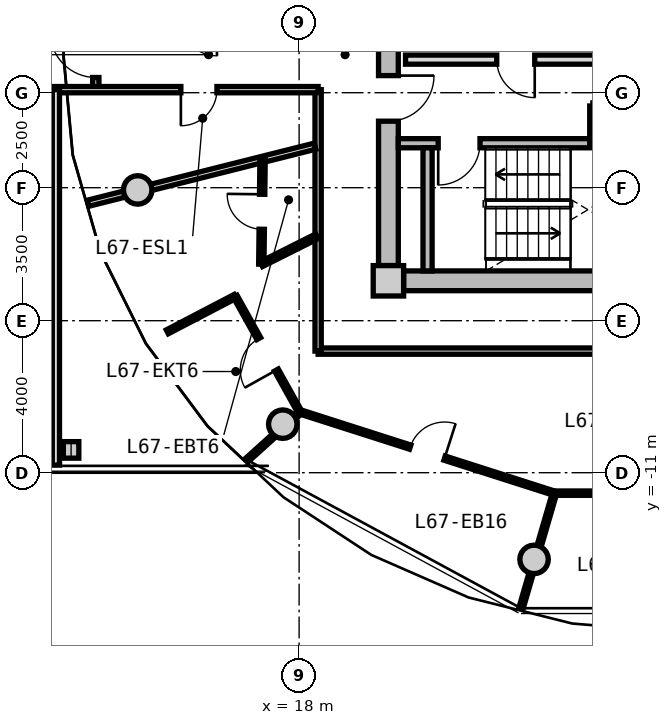
"""IFC4 building model, lengths in metres.
Left out: names, types, materials, properties, quantities, classifications, styles, units other than length and angle.
Written with IfcOpenShell. Run it as: python <this file> out.ifc"""

import sys

from ifc_helpers import new_model, si_unit, direction, frame, frame_2d, origin, origin_2d, place, context, subcontext, project, spatial, rectangle, circle, i_section, extrude, source, transform, mapped, element, fill, save


model = new_model("IFC4")
c1 = context("Model", 3, precision=1e-05, world=origin(), true_north=direction((0.0, 1.0)))
c2 = subcontext(c1, "Body", "Model", "MODEL_VIEW")
j1 = project(units=[si_unit("LENGTHUNIT", "METRE"), si_unit("PLANEANGLEUNIT", "RADIAN")], contexts=[c1])
p1 = place(None, origin())
s1 = spatial("IfcSite", under=j1, at=p1, CompositionType="ELEMENT")
p2 = place(p1, origin())
s2 = spatial("IfcBuilding", under=s1, at=p2, CompositionType="ELEMENT")
p3 = place(p2, frame((0.0, 0.0, 216.95)))
s3 = spatial("IfcBuildingStorey", under=s2, at=p3, CompositionType="ELEMENT", Elevation=216.95)
m1 = source(origin(), c2, "Body", "SweptSolid", [
    extrude(rectangle(XDim=0.8, YDim=0.8, at=origin_2d()), origin(), (0.0, 0.0, 1.0), 3.05),
])
p4 = place(p3, frame((20.35, -5.95, 0.0), z_axis=(0.0, 0.0, 1.0), x_axis=(1.0, 0.0, 0.0)))
e1 = element("IfcColumn", 1, at=p4, inside=s3, PredefinedType="COLUMN", context=c2, shape_type="MappedRepresentation", body=[
    mapped(m1, transform((0.0, 0.0, 0.0), x_axis=(1.0, 0.0, 0.0), y_axis=(0.0, 1.0, 0.0), z_axis=(0.0, 0.0, 1.0), scale=1.0)),
])
m2 = source(origin(), c2, "Body", "SweptSolid", [
    extrude(rectangle(XDim=14.5, YDim=0.52, at=frame_2d((7.25, 0.0))), origin(), (0.0, 0.0, 1.0), 2.76),
])
p5 = place(p3, frame((35.25, -5.95, 0.0), z_axis=(0.0, 0.0, 1.0), x_axis=(-1.0, 0.0, 0.0)))
e2 = element("IfcWall", 2, at=p5, inside=s3, PredefinedType="SHEAR", context=c2, shape_type="MappedRepresentation", body=[
    mapped(m2, transform((0.0, 0.0, 0.0), x_axis=(1.0, 0.0, 0.0), y_axis=(0.0, 1.0, 0.0), z_axis=(0.0, 0.0, 1.0), scale=1.0)),
])
m3 = source(origin(), c2, "Body", "SweptSolid", [
    extrude(rectangle(XDim=11.1, YDim=0.52, at=frame_2d((5.55, 0.0))), origin(), (0.0, 0.0, 1.0), 2.76),
])
p6 = place(p3, frame((20.35, -5.55, 0.0), z_axis=(0.0, 0.0, 1.0), x_axis=(0.0, 1.0, 0.0)))
e3 = element("IfcWall", 3, at=p6, inside=s3, PredefinedType="SHEAR", context=c2, shape_type="MappedRepresentation", body=[
    mapped(m3, transform((0.0, 0.0, 0.0), x_axis=(1.0, 0.0, 0.0), y_axis=(0.0, 1.0, 0.0), z_axis=(0.0, 0.0, 1.0), scale=1.0)),
])
p7 = place(p6, frame((3.8, 0.0, 0.0)))
e4 = element("IfcOpeningElement", 4, at=p7, cuts=e3, PredefinedType="OPENING", context=c2, shape_type="SweptSolid", body=[
    extrude(rectangle(XDim=1.2, YDim=2.15, at=frame_2d((0.6, 1.075))), frame((0.0, 0.27, 0.0), z_axis=(0.0, -1.0, 0.0), x_axis=(1.0, 0.0, 0.0)), (0.0, 0.0, 1.0), 0.54),
])
m4 = source(origin(), c2, "Body", "SweptSolid", [
    extrude(circle(Radius=0.375, at=origin_2d()), origin(), (0.0, 0.0, 1.0), 3.05),
])
for number, where, z_axis, x_axis in (
    (5, (13.753, -3.559, 0.0), (0.0, 0.0, 1.0), (1.0, 0.0, 0.0)),
    (6, (17.57, -9.723, 0.0), (0.0, 0.0, 1.0), (1.0, 0.0, 0.0)),
    (7, (24.182, -13.281, 0.0), (0.0, 0.0, 1.0), (1.0, 0.0, 0.0)),
):
    element("IfcColumn", number, at=place(p3, frame(where, z_axis=z_axis, x_axis=x_axis)), inside=s3, PredefinedType="COLUMN", context=c2, shape_type="MappedRepresentation", body=[
        mapped(m4, transform((0.0, 0.0, 0.0), x_axis=(1.0, 0.0, 0.0), y_axis=(0.0, 1.0, 0.0), z_axis=(0.0, 0.0, 1.0), scale=1.0)),
    ])
m5 = source(origin(), c2, "Body", "SweptSolid", [
    extrude(i_section(OverallWidth=0.407, OverallDepth=0.435, WebThickness=0.024, FlangeThickness=0.039, FilletRadius=0.015, at=origin_2d()), origin(), (0.0, 0.0, 1.0), 3.05),
])
p8 = place(p3, frame((12.0, -10.4, 0.0), z_axis=(0.0, 0.0, 1.0), x_axis=(1.0, 0.0, 0.0)))
e8 = element("IfcColumn", 8, at=p8, inside=s3, PredefinedType="COLUMN", context=c2, shape_type="MappedRepresentation", body=[
    mapped(m5, transform((0.0, 0.0, 0.0), x_axis=(1.0, 0.0, 0.0), y_axis=(0.0, 1.0, 0.0), z_axis=(0.0, 0.0, 1.0), scale=1.0)),
])
m6 = source(origin(), c2, "Body", "SweptSolid", [
    extrude(rectangle(XDim=7.93, YDim=0.24, at=frame_2d((3.965, 0.0))), origin(), (0.0, 0.0, 1.0), 2.76),
])
p9 = place(p3, frame((20.61, -2.33, 0.0), z_axis=(0.0, 0.0, 1.0), x_axis=(1.0, 0.0, 0.0)))
e9 = element("IfcWall", 9, at=p9, inside=s3, PredefinedType="PARTITIONING", context=c2, shape_type="MappedRepresentation", body=[
    mapped(m6, transform((0.0, 0.0, 0.0), x_axis=(1.0, 0.0, 0.0), y_axis=(0.0, 1.0, 0.0), z_axis=(0.0, 0.0, 1.0), scale=1.0)),
])
p10 = place(p9, frame((1.05, 0.0, 0.0)))
e10 = element("IfcOpeningElement", 10, at=p10, cuts=e9, PredefinedType="OPENING", context=c2, shape_type="SweptSolid", body=[
    extrude(rectangle(XDim=1.1, YDim=2.15, at=frame_2d((0.55, 1.075))), frame((0.0, 0.13, 0.0), z_axis=(0.0, -1.0, 0.0), x_axis=(1.0, 0.0, 0.0)), (0.0, 0.0, 1.0), 0.26),
])
m7 = source(origin(), c2, "Body", "SweptSolid", [
    extrude(rectangle(XDim=3.24, YDim=0.24, at=frame_2d((1.62, 0.0))), origin(), (0.0, 0.0, 1.0), 2.76),
])
p11 = place(p3, frame((21.38, -5.69, 0.0), z_axis=(0.0, 0.0, 1.0), x_axis=(0.0, 1.0, 0.0)))
e11 = element("IfcWall", 11, at=p11, inside=s3, PredefinedType="PARTITIONING", context=c2, shape_type="MappedRepresentation", body=[
    mapped(m7, transform((0.0, 0.0, 0.0), x_axis=(1.0, 0.0, 0.0), y_axis=(0.0, 1.0, 0.0), z_axis=(0.0, 0.0, 1.0), scale=1.0)),
])
m8 = source(origin(), c2, "Body", "SweptSolid", [
    extrude(rectangle(XDim=7.62, YDim=0.24, at=frame_2d((3.81, 0.0))), origin(), (0.0, 0.0, 1.0), 2.745),
])
p12 = place(p3, frame((20.8, -0.13, 0.0), z_axis=(0.0, 0.0, 1.0), x_axis=(1.0, 0.0, 0.0)))
e12 = element("IfcWall", 12, at=p12, inside=s3, PredefinedType="PARTITIONING", context=c2, shape_type="MappedRepresentation", body=[
    mapped(m8, transform((0.0, 0.0, 0.0), x_axis=(1.0, 0.0, 0.0), y_axis=(0.0, 1.0, 0.0), z_axis=(0.0, 0.0, 1.0), scale=1.0)),
])
p13 = place(p12, frame((6.22, 0.0, 0.0)))
e13 = element("IfcOpeningElement", 13, at=p13, cuts=e12, PredefinedType="OPENING", context=c2, shape_type="SweptSolid", body=[
    extrude(rectangle(XDim=1.0, YDim=2.1, at=frame_2d((0.5, 1.05))), frame((0.0, 0.13, 0.0), z_axis=(0.0, -1.0, 0.0), x_axis=(1.0, 0.0, 0.0)), (0.0, 0.0, 1.0), 0.26),
])
p14 = place(p12, frame((2.4, 0.0, 0.0)))
e14 = element("IfcOpeningElement", 14, at=p14, cuts=e12, PredefinedType="OPENING", context=c2, shape_type="SweptSolid", body=[
    extrude(rectangle(XDim=1.0, YDim=2.1, at=frame_2d((0.5, 1.05))), frame((0.0, 0.13, 0.0), z_axis=(0.0, -1.0, 0.0), x_axis=(1.0, 0.0, 0.0)), (0.0, 0.0, 1.0), 0.26),
])
m9 = source(origin(), c2, "Body", "SweptSolid", [
    extrude(rectangle(XDim=0.98, YDim=0.165, at=frame_2d((0.49, 0.0))), origin(), (0.0, 0.0, 1.0), 2.745),
])
p15 = place(p3, frame((25.73, -2.33, 0.0), z_axis=(0.0, 0.0, 1.0), x_axis=(0.0, 1.0, 0.0)))
e15 = element("IfcWall", 15, at=p15, inside=s3, PredefinedType="PARTITIONING", context=c2, shape_type="MappedRepresentation", body=[
    mapped(m9, transform((0.0, 0.0, 0.0), x_axis=(1.0, 0.0, 0.0), y_axis=(0.0, 1.0, 0.0), z_axis=(0.0, 0.0, 1.0), scale=1.0)),
])
m10 = source(origin(), c2, "Body", "SweptSolid", [
    extrude(rectangle(XDim=19.0, YDim=0.165, at=frame_2d((9.5, 0.0))), origin(), (0.0, 0.0, 1.0), 2.745),
])
p16 = place(p3, frame((37.5, -7.8, 0.0), z_axis=(0.0, 0.0, 1.0), x_axis=(-1.0, 0.0, 0.0)))
e16 = element("IfcWall", 16, at=p16, inside=s3, PredefinedType="PARTITIONING", context=c2, shape_type="MappedRepresentation", body=[
    mapped(m10, transform((0.0, 0.0, 0.0), x_axis=(1.0, 0.0, 0.0), y_axis=(0.0, 1.0, 0.0), z_axis=(0.0, 0.0, 1.0), scale=1.0)),
])
p17 = place(p16, frame((9.392, 0.0, 0.0)))
e17 = element("IfcOpeningElement", 17, at=p17, cuts=e16, PredefinedType="OPENING", context=c2, shape_type="SweptSolid", body=[
    extrude(rectangle(XDim=1.05, YDim=2.15, at=frame_2d((0.525, 1.075))), frame((0.0, 0.093, 0.0), z_axis=(0.0, -1.0, 0.0), x_axis=(1.0, 0.0, 0.0)), (0.0, 0.0, 1.0), 0.185),
])
m11 = source(origin(), c2, "Body", "SweptSolid", [
    extrude(rectangle(XDim=6.88, YDim=0.165, at=frame_2d((3.44, 0.0))), origin(), (0.0, 0.0, 1.0), 2.745),
])
p18 = place(p3, frame((18.5, -7.8, 0.0), z_axis=(0.0, 0.0, 1.0), x_axis=(0.0, 1.0, 0.0)))
e18 = element("IfcWall", 18, at=p18, inside=s3, PredefinedType="PARTITIONING", context=c2, shape_type="MappedRepresentation", body=[
    mapped(m11, transform((0.0, 0.0, 0.0), x_axis=(1.0, 0.0, 0.0), y_axis=(0.0, 1.0, 0.0), z_axis=(0.0, 0.0, 1.0), scale=1.0)),
])
m12 = source(origin(), c2, "Body", "SweptSolid", [
    extrude(rectangle(XDim=6.157, YDim=0.165, at=frame_2d((3.079, 0.0))), origin(), (0.0, 0.0, 1.0), 2.345),
])
p19 = place(p3, frame((18.42, -2.407, 0.0), z_axis=(0.0, 0.0, 1.0), x_axis=(-0.969840867184, -0.243738984038, 0.0)))
e19 = element("IfcWall", 19, at=p19, inside=s3, PredefinedType="PARTITIONING", context=c2, shape_type="MappedRepresentation", body=[
    mapped(m12, transform((0.0, 0.0, 0.0), x_axis=(1.0, 0.0, 0.0), y_axis=(0.0, 1.0, 0.0), z_axis=(0.0, 0.0, 1.0), scale=1.0)),
])
m13 = source(origin(), c2, "Body", "SweptSolid", [
    extrude(rectangle(XDim=7.024, YDim=0.115, at=frame_2d((3.512, 0.0))), origin(), (0.0, 0.0, 1.0), 2.745),
])
p20 = place(p3, frame((18.03, -9.401, 0.0), z_axis=(0.0, 0.0, 1.0), x_axis=(0.952454006655, -0.304682400552, 0.0)))
e20 = element("IfcWall", 20, at=p20, inside=s3, PredefinedType="PARTITIONING", context=c2, shape_type="MappedRepresentation", body=[
    mapped(m13, transform((0.0, 0.0, 0.0), x_axis=(1.0, 0.0, 0.0), y_axis=(0.0, 1.0, 0.0), z_axis=(0.0, 0.0, 1.0), scale=1.0)),
])
p21 = place(p20, frame((3.037, 0.0, 0.0)))
e21 = element("IfcOpeningElement", 21, at=p21, cuts=e20, PredefinedType="OPENING", context=c2, shape_type="SweptSolid", body=[
    extrude(rectangle(XDim=0.95, YDim=2.1, at=frame_2d((0.475, 1.05))), frame((0.0, 0.067, 0.0), z_axis=(0.0, -1.0, 0.0), x_axis=(1.0, 0.0, 0.0)), (0.0, 0.0, 1.0), 0.135),
])
m14 = source(origin(), c2, "Body", "SweptSolid", [
    extrude(rectangle(XDim=1.905, YDim=0.115, at=frame_2d((0.953, 0.0))), origin(), (0.0, 0.0, 1.0), 2.345),
])
p22 = place(p3, frame((18.03, -9.401, 0.0), z_axis=(0.0, 0.0, 1.0), x_axis=(-0.742624708137, -0.669707804094, 0.0)))
e22 = element("IfcWall", 22, at=p22, inside=s3, PredefinedType="PARTITIONING", context=c2, shape_type="MappedRepresentation", body=[
    mapped(m14, transform((0.0, 0.0, 0.0), x_axis=(1.0, 0.0, 0.0), y_axis=(0.0, 1.0, 0.0), z_axis=(0.0, 0.0, 1.0), scale=1.0)),
])
m15 = source(origin(), c2, "Body", "SweptSolid", [
    extrude(rectangle(XDim=6.558, YDim=0.115, at=frame_2d((3.279, 0.0))), origin(), (0.0, 0.0, 1.0), 2.745),
])
p23 = place(p3, frame((24.721, -11.539, 0.0), z_axis=(0.0, 0.0, 1.0), x_axis=(1.0, 0.0, 0.0)))
e23 = element("IfcWall", 23, at=p23, inside=s3, PredefinedType="PARTITIONING", context=c2, shape_type="MappedRepresentation", body=[
    mapped(m15, transform((0.0, 0.0, 0.0), x_axis=(1.0, 0.0, 0.0), y_axis=(0.0, 1.0, 0.0), z_axis=(0.0, 0.0, 1.0), scale=1.0)),
])
p24 = place(p23, frame((2.804, 0.0, 0.0)))
e24 = element("IfcOpeningElement", 24, at=p24, cuts=e23, PredefinedType="OPENING", context=c2, shape_type="SweptSolid", body=[
    extrude(rectangle(XDim=0.95, YDim=2.1, at=frame_2d((0.475, 1.05))), frame((0.0, 0.067, 0.0), z_axis=(0.0, -1.0, 0.0), x_axis=(1.0, 0.0, 0.0)), (0.0, 0.0, 1.0), 0.135),
])
m16 = source(origin(), c2, "Body", "SweptSolid", [
    extrude(rectangle(XDim=3.173, YDim=0.115, at=frame_2d((1.587, 0.0))), origin(), (0.0, 0.0, 1.0), 2.345),
])
p25 = place(p3, frame((24.721, -11.539, 0.0), z_axis=(0.0, 0.0, 1.0), x_axis=(-0.279878875918, -0.960035319566, 0.0)))
e25 = element("IfcWall", 25, at=p25, inside=s3, PredefinedType="PARTITIONING", context=c2, shape_type="MappedRepresentation", body=[
    mapped(m16, transform((0.0, 0.0, 0.0), x_axis=(1.0, 0.0, 0.0), y_axis=(0.0, 1.0, 0.0), z_axis=(0.0, 0.0, 1.0), scale=1.0)),
])
m17 = source(origin(), c2, "Body", "SweptSolid", [
    extrude(rectangle(XDim=1.638, YDim=0.14, at=frame_2d((0.819, 0.0))), origin(), (0.0, 0.0, 1.0), 2.745),
])
p26 = place(p3, frame((18.47, -4.778, 0.0), z_axis=(0.0, 0.0, 1.0), x_axis=(-0.893919977945, -0.448226586707, 0.0)))
e26 = element("IfcWall", 26, at=p26, inside=s3, PredefinedType="PARTITIONING", context=c2, shape_type="MappedRepresentation", body=[
    mapped(m17, transform((0.0, 0.0, 0.0), x_axis=(1.0, 0.0, 0.0), y_axis=(0.0, 1.0, 0.0), z_axis=(0.0, 0.0, 1.0), scale=1.0)),
])
m18 = source(origin(), c2, "Body", "SweptSolid", [
    extrude(rectangle(XDim=2.759, YDim=0.14, at=frame_2d((1.379, 0.0))), origin(), (0.0, 0.0, 1.0), 2.745),
])
p27 = place(p3, frame((17.005, -5.513, 0.0), z_axis=(0.0, 0.0, 1.0), x_axis=(0.01194710728, 0.999928630767, 0.0)))
e27 = element("IfcWall", 27, at=p27, inside=s3, PredefinedType="PARTITIONING", context=c2, shape_type="MappedRepresentation", body=[
    mapped(m18, transform((0.0, 0.0, 0.0), x_axis=(1.0, 0.0, 0.0), y_axis=(0.0, 1.0, 0.0), z_axis=(0.0, 0.0, 1.0), scale=1.0)),
])
p28 = place(p27, frame((0.919, 0.0, 0.0)))
e28 = element("IfcOpeningElement", 28, at=p28, cuts=e27, PredefinedType="OPENING", context=c2, shape_type="SweptSolid", body=[
    extrude(rectangle(XDim=0.92, YDim=2.1, at=frame_2d((0.46, 1.05))), frame((0.0, 0.08, 0.0), z_axis=(0.0, -1.0, 0.0), x_axis=(1.0, 0.0, 0.0)), (0.0, 0.0, 1.0), 0.16),
])
m19 = source(origin(), c2, "Body", "SweptSolid", [
    extrude(rectangle(XDim=2.015, YDim=0.115, at=frame_2d((1.007, 0.0))), origin(), (0.0, 0.0, 1.0), 2.745),
])
p29 = place(p3, frame((16.318, -6.36, 0.0), z_axis=(0.0, 0.0, 1.0), x_axis=(-0.886437892009, -0.462847559797, 0.0)))
e29 = element("IfcWall", 29, at=p29, inside=s3, PredefinedType="PARTITIONING", context=c2, shape_type="MappedRepresentation", body=[
    mapped(m19, transform((0.0, 0.0, 0.0), x_axis=(1.0, 0.0, 0.0), y_axis=(0.0, 1.0, 0.0), z_axis=(0.0, 0.0, 1.0), scale=1.0)),
])
m20 = source(origin(), c2, "Body", "SweptSolid", [
    extrude(rectangle(XDim=3.493, YDim=0.115, at=frame_2d((1.746, 0.0))), origin(), (0.0, 0.0, 1.0), 2.745),
])
p30 = place(p3, frame((16.318, -6.36, 0.0), z_axis=(0.0, 0.0, 1.0), x_axis=(0.487896553961, -0.872901456427, 0.0)))
e30 = element("IfcWall", 30, at=p30, inside=s3, PredefinedType="PARTITIONING", context=c2, shape_type="MappedRepresentation", body=[
    mapped(m20, transform((0.0, 0.0, 0.0), x_axis=(1.0, 0.0, 0.0), y_axis=(0.0, 1.0, 0.0), z_axis=(0.0, 0.0, 1.0), scale=1.0)),
])
p31 = place(p30, frame((1.271, 0.0, 0.0)))
e31 = element("IfcOpeningElement", 31, at=p31, cuts=e30, PredefinedType="OPENING", context=c2, shape_type="SweptSolid", body=[
    extrude(rectangle(XDim=0.95, YDim=2.1, at=frame_2d((0.475, 1.05))), frame((0.0, 0.067, 0.0), z_axis=(0.0, -1.0, 0.0), x_axis=(1.0, 0.0, 0.0)), (0.0, 0.0, 1.0), 0.135),
])
m21 = source(origin(), c2, "Body", "SweptSolid", [
    extrude(rectangle(XDim=1.84, YDim=0.165, at=frame_2d((0.92, 0.0))), origin(), (0.0, 0.0, 1.0), 2.745),
])
p32 = place(p3, frame((12.65, -0.92, 0.0), z_axis=(0.0, 0.0, 1.0), x_axis=(0.0, 1.0, 0.0)))
e32 = element("IfcWall", 32, at=p32, inside=s3, PredefinedType="PARTITIONING", context=c2, shape_type="MappedRepresentation", body=[
    mapped(m21, transform((0.0, 0.0, 0.0), x_axis=(1.0, 0.0, 0.0), y_axis=(0.0, 1.0, 0.0), z_axis=(0.0, 0.0, 1.0), scale=1.0)),
])
p33 = place(p32, frame((0.32, 0.0, 0.0)))
e33 = element("IfcOpeningElement", 33, at=p33, cuts=e32, PredefinedType="OPENING", context=c2, shape_type="SweptSolid", body=[
    extrude(rectangle(XDim=1.2, YDim=2.15, at=frame_2d((0.6, 1.075))), frame((0.0, 0.093, 0.0), z_axis=(0.0, -1.0, 0.0), x_axis=(1.0, 0.0, 0.0)), (0.0, 0.0, 1.0), 0.185),
])
m22 = source(origin(), c2, "Body", "SweptSolid", [
    extrude(rectangle(XDim=37.0, YDim=0.165, at=frame_2d((18.5, 0.0))), origin(), (0.0, 0.0, 1.0), 2.745),
])
p34 = place(p3, frame((-18.5, -0.92, 0.0), z_axis=(0.0, 0.0, 1.0), x_axis=(1.0, 0.0, 0.0)))
e34 = element("IfcWall", 34, at=p34, inside=s3, PredefinedType="PARTITIONING", context=c2, shape_type="MappedRepresentation", body=[
    mapped(m22, transform((0.0, 0.0, 0.0), x_axis=(1.0, 0.0, 0.0), y_axis=(0.0, 1.0, 0.0), z_axis=(0.0, 0.0, 1.0), scale=1.0)),
])
p35 = place(p34, frame((2.662, 0.0, 0.0)))
e35 = element("IfcOpeningElement", 35, at=p35, cuts=e34, PredefinedType="OPENING", context=c2, shape_type="SweptSolid", body=[
    extrude(rectangle(XDim=0.95, YDim=2.1, at=frame_2d((0.475, 1.05))), frame((0.0, 0.093, 0.0), z_axis=(0.0, -1.0, 0.0), x_axis=(1.0, 0.0, 0.0)), (0.0, 0.0, 1.0), 0.185),
])
p36 = place(p34, frame((33.388, 0.0, 0.0)))
e36 = element("IfcOpeningElement", 36, at=p36, cuts=e34, PredefinedType="OPENING", context=c2, shape_type="SweptSolid", body=[
    extrude(rectangle(XDim=0.95, YDim=2.1, at=frame_2d((0.475, 1.05))), frame((0.0, 0.093, 0.0), z_axis=(0.0, -1.0, 0.0), x_axis=(1.0, 0.0, 0.0)), (0.0, 0.0, 1.0), 0.185),
])
p37 = place(p34, frame((9.075, 0.0, 0.0)))
e37 = element("IfcOpeningElement", 37, at=p37, cuts=e34, PredefinedType="OPENING", context=c2, shape_type="SweptSolid", body=[
    extrude(rectangle(XDim=1.25, YDim=2.2, at=frame_2d((0.625, 1.1))), frame((0.0, 0.093, 0.0), z_axis=(0.0, -1.0, 0.0), x_axis=(1.0, 0.0, 0.0)), (0.0, 0.0, 1.0), 0.185),
])
p38 = place(p34, frame((14.875, 0.0, 0.0)))
e38 = element("IfcOpeningElement", 38, at=p38, cuts=e34, PredefinedType="OPENING", context=c2, shape_type="SweptSolid", body=[
    extrude(rectangle(XDim=1.25, YDim=2.2, at=frame_2d((0.625, 1.1))), frame((0.0, 0.093, 0.0), z_axis=(0.0, -1.0, 0.0), x_axis=(1.0, 0.0, 0.0)), (0.0, 0.0, 1.0), 0.185),
])
p39 = place(p34, frame((23.03, 0.0, 0.0)))
e39 = element("IfcOpeningElement", 39, at=p39, cuts=e34, PredefinedType="OPENING", context=c2, shape_type="SweptSolid", body=[
    extrude(rectangle(XDim=1.25, YDim=2.2, at=frame_2d((0.625, 1.1))), frame((0.0, 0.093, 0.0), z_axis=(0.0, -1.0, 0.0), x_axis=(1.0, 0.0, 0.0)), (0.0, 0.0, 1.0), 0.185),
])
m23 = source(origin(), c2, "Body", "SweptSolid", [
    extrude(rectangle(XDim=9.88, YDim=0.19, at=frame_2d((4.94, 0.0))), origin(), (0.0, 0.0, 1.0), 2.745),
])
p40 = place(p3, frame((11.6, -10.8, 0.0), z_axis=(0.0, 0.0, 1.0), x_axis=(0.0, 1.0, 0.0)))
e40 = element("IfcWall", 40, at=p40, inside=s3, PredefinedType="PARTITIONING", context=c2, shape_type="MappedRepresentation", body=[
    mapped(m23, transform((0.0, 0.0, 0.0), x_axis=(1.0, 0.0, 0.0), y_axis=(0.0, 1.0, 0.0), z_axis=(0.0, 0.0, 1.0), scale=1.0)),
])
m24 = source(origin(), c2, "Body", "SweptSolid", [
    extrude(rectangle(XDim=1.1, YDim=2.15, at=frame_2d((0.55, 1.075))), frame((0.0, 0.025, 0.0), z_axis=(0.0, -1.0, 0.0), x_axis=(1.0, 0.0, 0.0)), (0.0, 0.0, 1.0), 0.05),
])
p41 = place(p10, frame((1.1, 0.0, 0.0), z_axis=(0.0, 0.0, 1.0), x_axis=(-1.0, 0.0, 0.0)))
e41 = element("IfcDoor", 41, at=p41, inside=s3, OperationType="SINGLE_SWING_RIGHT", PredefinedType="DOOR", context=c2, shape_type="MappedRepresentation", body=[
    mapped(m24, transform((0.0, 0.0, 0.0), x_axis=(1.0, 0.0, 0.0), y_axis=(0.0, 1.0, 0.0), z_axis=(0.0, 0.0, 1.0), scale=1.0)),
])
fill(e10, e41)
m25 = source(origin(), c2, "Body", "SweptSolid", [
    extrude(rectangle(XDim=1.2, YDim=2.15, at=frame_2d((0.6, 1.075))), frame((0.0, 0.025, 0.0), z_axis=(0.0, -1.0, 0.0), x_axis=(1.0, 0.0, 0.0)), (0.0, 0.0, 1.0), 0.05),
])
p42 = place(p7, frame((1.2, 0.0, 0.0), z_axis=(0.0, 0.0, 1.0), x_axis=(-1.0, 0.0, 0.0)))
e42 = element("IfcDoor", 42, at=p42, inside=s3, OperationType="SINGLE_SWING_LEFT", PredefinedType="DOOR", context=c2, shape_type="MappedRepresentation", body=[
    mapped(m25, transform((0.0, 0.0, 0.0), x_axis=(1.0, 0.0, 0.0), y_axis=(0.0, 1.0, 0.0), z_axis=(0.0, 0.0, 1.0), scale=1.0)),
])
fill(e4, e42)
m26 = source(origin(), c2, "Body", "SweptSolid", [
    extrude(rectangle(XDim=1.0, YDim=2.1, at=frame_2d((0.5, 1.05))), frame((0.0, 0.025, 0.0), z_axis=(0.0, -1.0, 0.0), x_axis=(1.0, 0.0, 0.0)), (0.0, 0.0, 1.0), 0.05),
])
p43 = place(p14, frame((1.0, 0.0, 0.0), z_axis=(0.0, 0.0, 1.0), x_axis=(-1.0, 0.0, 0.0)))
e43 = element("IfcDoor", 43, at=p43, inside=s3, OperationType="SINGLE_SWING_LEFT", PredefinedType="DOOR", context=c2, shape_type="MappedRepresentation", body=[
    mapped(m26, transform((0.0, 0.0, 0.0), x_axis=(1.0, 0.0, 0.0), y_axis=(0.0, 1.0, 0.0), z_axis=(0.0, 0.0, 1.0), scale=1.0)),
])
fill(e14, e43)
m27 = source(origin(), c2, "Body", "SweptSolid", [
    extrude(rectangle(XDim=0.95, YDim=2.1, at=frame_2d((0.475, 1.05))), frame((0.0, 0.025, 0.0), z_axis=(0.0, -1.0, 0.0), x_axis=(1.0, 0.0, 0.0)), (0.0, 0.0, 1.0), 0.05),
])
p44 = place(p36, frame((0.95, 0.0, 0.0), z_axis=(0.0, 0.0, 1.0), x_axis=(-1.0, 0.0, 0.0)))
e44 = element("IfcDoor", 44, at=p44, inside=s3, OperationType="SINGLE_SWING_RIGHT", PredefinedType="DOOR", context=c2, shape_type="MappedRepresentation", body=[
    mapped(m27, transform((0.0, 0.0, 0.0), x_axis=(1.0, 0.0, 0.0), y_axis=(0.0, 1.0, 0.0), z_axis=(0.0, 0.0, 1.0), scale=1.0)),
])
fill(e36, e44)
m28 = source(origin(), c2, "Body", "SweptSolid", [
    extrude(rectangle(XDim=0.92, YDim=2.1, at=frame_2d((0.46, 1.05))), frame((0.0, 0.025, 0.0), z_axis=(0.0, -1.0, 0.0), x_axis=(1.0, 0.0, 0.0)), (0.0, 0.0, 1.0), 0.05),
])
p45 = place(p28, origin())
e45 = element("IfcDoor", 45, at=p45, inside=s3, OperationType="SINGLE_SWING_RIGHT", PredefinedType="DOOR", context=c2, shape_type="MappedRepresentation", body=[
    mapped(m28, transform((0.0, 0.0, 0.0), x_axis=(1.0, 0.0, 0.0), y_axis=(0.0, 1.0, 0.0), z_axis=(0.0, 0.0, 1.0), scale=1.0)),
])
fill(e28, e45)
p46 = place(p31, frame((0.95, 0.0, 0.0), z_axis=(0.0, 0.0, 1.0), x_axis=(-1.0, 0.0, 0.0)))
e46 = element("IfcDoor", 46, at=p46, inside=s3, OperationType="SINGLE_SWING_LEFT", PredefinedType="DOOR", context=c2, shape_type="MappedRepresentation", body=[
    mapped(m27, transform((0.0, 0.0, 0.0), x_axis=(1.0, 0.0, 0.0), y_axis=(0.0, 1.0, 0.0), z_axis=(0.0, 0.0, 1.0), scale=1.0)),
])
fill(e31, e46)
p47 = place(p21, origin())
e47 = element("IfcDoor", 47, at=p47, inside=s3, OperationType="SINGLE_SWING_RIGHT", PredefinedType="DOOR", context=c2, shape_type="MappedRepresentation", body=[
    mapped(m27, transform((0.0, 0.0, 0.0), x_axis=(1.0, 0.0, 0.0), y_axis=(0.0, 1.0, 0.0), z_axis=(0.0, 0.0, 1.0), scale=1.0)),
])
fill(e21, e47)
p48 = place(p33, origin())
e48 = element("IfcDoor", 48, at=p48, inside=s3, OperationType="SINGLE_SWING_RIGHT", PredefinedType="DOOR", context=c2, shape_type="MappedRepresentation", body=[
    mapped(m25, transform((0.0, 0.0, 0.0), x_axis=(1.0, 0.0, 0.0), y_axis=(0.0, 1.0, 0.0), z_axis=(0.0, 0.0, 1.0), scale=1.0)),
])
fill(e33, e48)
save(model, sys.argv[1])
